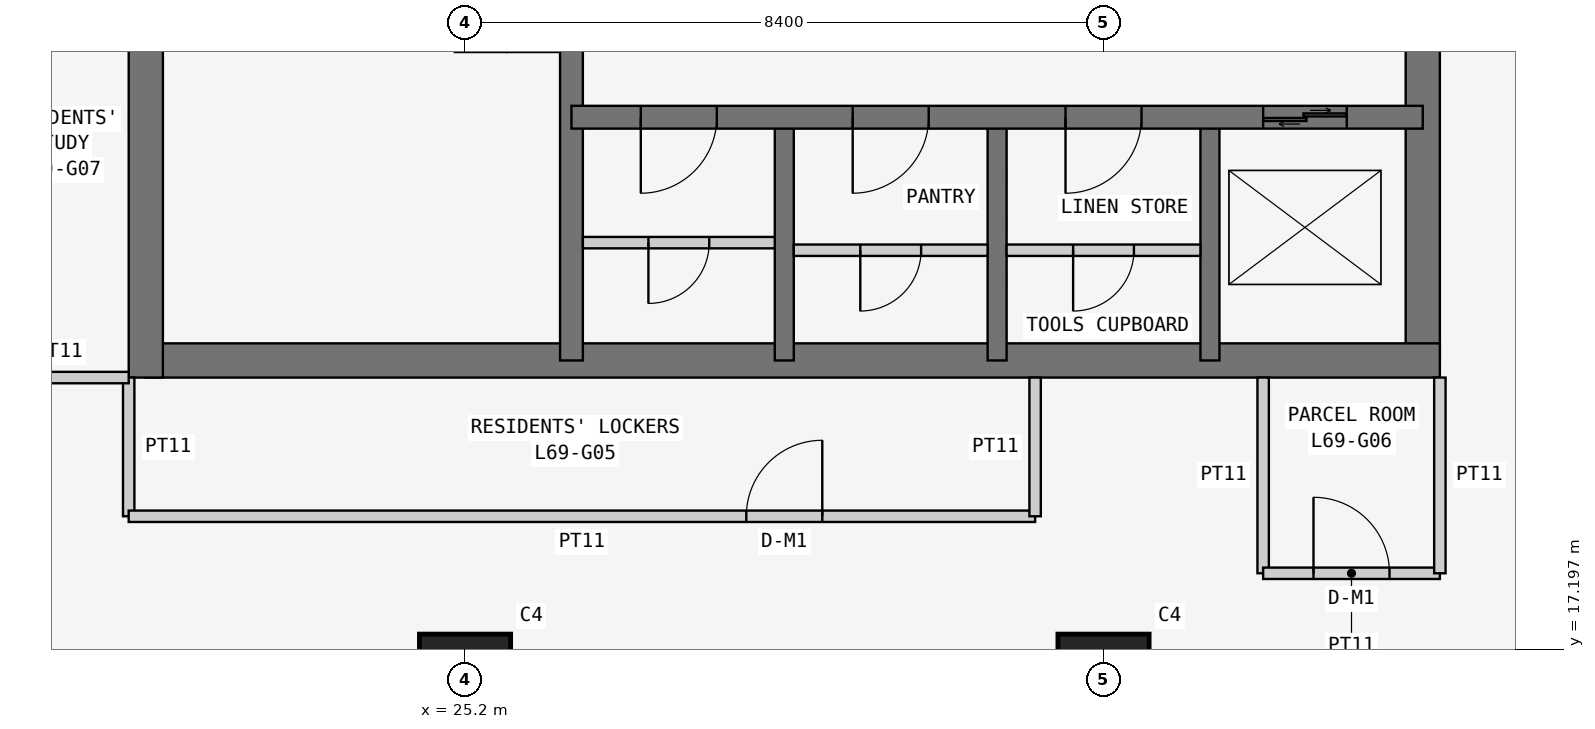
"""IFC4 building model, lengths in metres.
Left out: names, types, materials, properties, quantities, classifications, styles, units other than length and angle.
Written with IfcOpenShell. Run it as: python <this file> out.ifc"""

import sys

from ifc_helpers import new_model, si_unit, direction, frame, frame_2d, origin, origin_2d, place, context, subcontext, project, spatial, rectangle, extrude, element, fill, save


model = new_model("IFC4")
c1 = context("Model", 3, precision=1e-05, world=origin(), true_north=direction((0.0, 1.0)))
c2 = subcontext(c1, "Body", "Model", "MODEL_VIEW")
j1 = project(units=[si_unit("LENGTHUNIT", "METRE"), si_unit("PLANEANGLEUNIT", "RADIAN")], contexts=[c1])
p1 = place(None, origin())
s1 = spatial("IfcSite", under=j1, at=p1, CompositionType="ELEMENT")
p2 = place(p1, origin())
s2 = spatial("IfcBuilding", under=s1, at=p2, CompositionType="ELEMENT")
p3 = place(p2, frame((0.0, 0.0, 264.9)))
s3 = spatial("IfcBuildingStorey", under=s2, at=p3, CompositionType="ELEMENT", Elevation=264.9)
for number, where, z_axis, x_axis in (
    (1, (25.2, 16.8, 0.0), (0.0, 0.0, 1.0), (1.0, 0.0, 0.0)),
    (2, (33.6, 16.8, 0.0), (0.0, 0.0, 1.0), (1.0, 0.0, 0.0)),
):
    element("IfcColumn", number, at=place(p3, frame(where, z_axis=z_axis, x_axis=x_axis)), inside=s3, PredefinedType="COLUMN", context=c2, shape_type="SweptSolid", body=[
        extrude(rectangle(XDim=1.2, YDim=1.2, at=origin_2d()), origin(), (0.0, 0.0, 1.0), 3.6),
    ])
p4 = place(p3, frame((21.0, 21.0, 0.0), z_axis=(0.0, 0.0, 1.0), x_axis=(1.0, 0.0, 0.0)))
e3 = element("IfcWall", 3, at=p4, inside=s3, PredefinedType="SHEAR", context=c2, shape_type="SweptSolid", body=[
    extrude(rectangle(XDim=17.025, YDim=0.45, at=frame_2d((8.512, 0.0))), origin(), (0.0, 0.0, 1.0), 3.6),
])
p5 = place(p3, frame((37.8, 21.0, 0.0), z_axis=(0.0, 0.0, 1.0), x_axis=(0.0, 1.0, 0.0)))
e4 = element("IfcWall", 4, at=p5, inside=s3, PredefinedType="SHEAR", context=c2, shape_type="SweptSolid", body=[
    extrude(rectangle(XDim=17.025, YDim=0.45, at=frame_2d((8.512, 0.0))), origin(), (0.0, 0.0, 1.0), 3.6),
])
p6 = place(p5, frame((5.2, 0.0, 0.0)))
e5 = element("IfcOpeningElement", 5, at=p6, cuts=e4, PredefinedType="OPENING", context=c2, shape_type="SweptSolid", body=[
    extrude(rectangle(XDim=1.2, YDim=2.1, at=frame_2d((0.6, 1.05))), frame((0.0, 0.235, 0.0), z_axis=(0.0, -1.0, 0.0), x_axis=(1.0, 0.0, 0.0)), (0.0, 0.0, 1.0), 0.47),
])
p7 = place(p3, frame((21.0, 37.8, 0.0), z_axis=(0.0, 0.0, 1.0), x_axis=(0.0, -1.0, 0.0)))
e6 = element("IfcWall", 6, at=p7, inside=s3, PredefinedType="SHEAR", context=c2, shape_type="SweptSolid", body=[
    extrude(rectangle(XDim=17.025, YDim=0.45, at=frame_2d((8.513, 0.0))), origin(), (0.0, 0.0, 1.0), 3.6),
])
p8 = place(p7, frame((5.4, 0.0, 0.0)))
e7 = element("IfcOpeningElement", 7, at=p8, cuts=e6, PredefinedType="OPENING", context=c2, shape_type="SweptSolid", body=[
    extrude(rectangle(XDim=1.2, YDim=2.1, at=frame_2d((0.6, 1.05))), frame((0.0, 0.235, 0.0), z_axis=(0.0, -1.0, 0.0), x_axis=(1.0, 0.0, 0.0)), (0.0, 0.0, 1.0), 0.47),
])
p9 = place(p3, frame((26.6, 21.0, 0.0), z_axis=(0.0, 0.0, 1.0), x_axis=(0.0, 1.0, 0.0)))
e8 = element("IfcWall", 8, at=p9, inside=s3, PredefinedType="SHEAR", context=c2, shape_type="SweptSolid", body=[
    extrude(rectangle(XDim=16.8, YDim=0.3, at=frame_2d((8.4, 0.0))), origin(), (0.0, 0.0, 1.0), 3.6),
])
p10 = place(p9, frame((10.4, 0.0, 0.0)))
e9 = element("IfcOpeningElement", 9, at=p10, cuts=e8, PredefinedType="OPENING", context=c2, shape_type="SweptSolid", body=[
    extrude(rectangle(XDim=1.2, YDim=2.1, at=frame_2d((0.6, 1.05))), frame((0.0, 0.16, 0.0), z_axis=(0.0, -1.0, 0.0), x_axis=(1.0, 0.0, 0.0)), (0.0, 0.0, 1.0), 0.32),
])
p11 = place(p3, frame((26.6, 24.2, 0.0), z_axis=(0.0, 0.0, 1.0), x_axis=(1.0, 0.0, 0.0)))
e10 = element("IfcWall", 10, at=p11, inside=s3, PredefinedType="SHEAR", context=c2, shape_type="SweptSolid", body=[
    extrude(rectangle(XDim=11.2, YDim=0.3, at=frame_2d((5.6, 0.0))), origin(), (0.0, 0.0, 1.0), 3.6),
])
p12 = place(p11, frame((0.913, 0.0, 0.0)))
e11 = element("IfcOpeningElement", 11, at=p12, cuts=e10, PredefinedType="OPENING", context=c2, shape_type="SweptSolid", body=[
    extrude(rectangle(XDim=1.0, YDim=2.1, at=frame_2d((0.5, 1.05))), frame((0.0, 0.16, 0.0), z_axis=(0.0, -1.0, 0.0), x_axis=(1.0, 0.0, 0.0)), (0.0, 0.0, 1.0), 0.32),
])
p13 = place(p11, frame((3.7, 0.0, 0.0)))
e12 = element("IfcOpeningElement", 12, at=p13, cuts=e10, PredefinedType="OPENING", context=c2, shape_type="SweptSolid", body=[
    extrude(rectangle(XDim=1.0, YDim=2.1, at=frame_2d((0.5, 1.05))), frame((0.0, 0.16, 0.0), z_axis=(0.0, -1.0, 0.0), x_axis=(1.0, 0.0, 0.0)), (0.0, 0.0, 1.0), 0.32),
])
p14 = place(p11, frame((6.5, 0.0, 0.0)))
e13 = element("IfcOpeningElement", 13, at=p14, cuts=e10, PredefinedType="OPENING", context=c2, shape_type="SweptSolid", body=[
    extrude(rectangle(XDim=1.0, YDim=2.1, at=frame_2d((0.5, 1.05))), frame((0.0, 0.16, 0.0), z_axis=(0.0, -1.0, 0.0), x_axis=(1.0, 0.0, 0.0)), (0.0, 0.0, 1.0), 0.32),
])
p15 = place(p11, frame((9.1, 0.0, 0.0)))
e14 = element("IfcOpeningElement", 14, at=p15, cuts=e10, PredefinedType="OPENING", context=c2, shape_type="SweptSolid", body=[
    extrude(rectangle(XDim=1.1, YDim=2.1, at=frame_2d((0.55, 1.05))), frame((0.0, 0.16, 0.0), z_axis=(0.0, -1.0, 0.0), x_axis=(1.0, 0.0, 0.0)), (0.0, 0.0, 1.0), 0.32),
])
for number, where, z_axis, x_axis in (
    (15, (29.4, 21.0, 0.0), (0.0, 0.0, 1.0), (0.0, 1.0, 0.0)),
    (16, (32.2, 21.0, 0.0), (0.0, 0.0, 1.0), (0.0, 1.0, 0.0)),
    (17, (35.0, 21.0, 0.0), (0.0, 0.0, 1.0), (0.0, 1.0, 0.0)),
):
    element("IfcWall", number, at=place(p3, frame(where, z_axis=z_axis, x_axis=x_axis)), inside=s3, PredefinedType="SHEAR", context=c2, shape_type="SweptSolid", body=[
        extrude(rectangle(XDim=3.2, YDim=0.25, at=frame_2d((1.6, 0.0))), origin(), (0.0, 0.0, 1.0), 3.6),
    ])
p16 = place(p3, frame((20.775, 20.775, 0.0), z_axis=(0.0, 0.0, 1.0), x_axis=(0.0, -1.0, 0.0)))
e18 = element("IfcWall", 18, at=p16, inside=s3, PredefinedType="PARTITIONING", context=c2, shape_type="SweptSolid", body=[
    extrude(rectangle(XDim=1.825, YDim=0.15, at=frame_2d((0.913, 0.0))), origin(), (0.0, 0.0, 1.0), 3.45),
])
p17 = place(p3, frame((20.775, 18.95, 0.0), z_axis=(0.0, 0.0, 1.0), x_axis=(1.0, 0.0, 0.0)))
e19 = element("IfcWall", 19, at=p17, inside=s3, PredefinedType="PARTITIONING", context=c2, shape_type="SweptSolid", body=[
    extrude(rectangle(XDim=11.925, YDim=0.15, at=frame_2d((5.962, 0.0))), origin(), (0.0, 0.0, 1.0), 3.45),
])
p18 = place(p17, frame((8.125, 0.0, 0.0)))
e20 = element("IfcOpeningElement", 20, at=p18, cuts=e19, PredefinedType="OPENING", context=c2, shape_type="SweptSolid", body=[
    extrude(rectangle(XDim=1.0, YDim=2.1, at=frame_2d((0.5, 1.05))), frame((0.0, 0.085, 0.0), z_axis=(0.0, -1.0, 0.0), x_axis=(1.0, 0.0, 0.0)), (0.0, 0.0, 1.0), 0.17),
])
p19 = place(p3, frame((32.7, 18.95, 0.0), z_axis=(0.0, 0.0, 1.0), x_axis=(0.0, 1.0, 0.0)))
e21 = element("IfcWall", 21, at=p19, inside=s3, PredefinedType="PARTITIONING", context=c2, shape_type="SweptSolid", body=[
    extrude(rectangle(XDim=1.825, YDim=0.15, at=frame_2d((0.913, 0.0))), origin(), (0.0, 0.0, 1.0), 3.45),
])
p20 = place(p3, frame((35.7, 20.775, 0.0), z_axis=(0.0, 0.0, 1.0), x_axis=(0.0, -1.0, 0.0)))
e22 = element("IfcWall", 22, at=p20, inside=s3, PredefinedType="PARTITIONING", context=c2, shape_type="SweptSolid", body=[
    extrude(rectangle(XDim=2.575, YDim=0.15, at=frame_2d((1.288, 0.0))), origin(), (0.0, 0.0, 1.0), 3.45),
])
p21 = place(p3, frame((35.7, 18.2, 0.0), z_axis=(0.0, 0.0, 1.0), x_axis=(1.0, 0.0, 0.0)))
e23 = element("IfcWall", 23, at=p21, inside=s3, PredefinedType="PARTITIONING", context=c2, shape_type="SweptSolid", body=[
    extrude(rectangle(XDim=2.325, YDim=0.15, at=frame_2d((1.163, 0.0))), origin(), (0.0, 0.0, 1.0), 3.45),
])
p22 = place(p21, frame((0.663, 0.0, 0.0)))
e24 = element("IfcOpeningElement", 24, at=p22, cuts=e23, PredefinedType="OPENING", context=c2, shape_type="SweptSolid", body=[
    extrude(rectangle(XDim=1.0, YDim=2.1, at=frame_2d((0.5, 1.05))), frame((0.0, 0.085, 0.0), z_axis=(0.0, -1.0, 0.0), x_axis=(1.0, 0.0, 0.0)), (0.0, 0.0, 1.0), 0.17),
])
p23 = place(p3, frame((38.025, 18.2, 0.0), z_axis=(0.0, 0.0, 1.0), x_axis=(0.0, 1.0, 0.0)))
e25 = element("IfcWall", 25, at=p23, inside=s3, PredefinedType="PARTITIONING", context=c2, shape_type="SweptSolid", body=[
    extrude(rectangle(XDim=2.575, YDim=0.15, at=frame_2d((1.288, 0.0))), origin(), (0.0, 0.0, 1.0), 3.45),
])
p24 = place(p3, frame((18.95, 20.775, 0.0), z_axis=(0.0, 0.0, 1.0), x_axis=(1.0, 0.0, 0.0)))
e26 = element("IfcWall", 26, at=p24, inside=s3, PredefinedType="PARTITIONING", context=c2, shape_type="SweptSolid", body=[
    extrude(rectangle(XDim=1.825, YDim=0.15, at=frame_2d((0.913, 0.0))), origin(), (0.0, 0.0, 1.0), 3.45),
])
p25 = place(p3, frame((26.75, 22.55, 0.0), z_axis=(0.0, 0.0, 1.0), x_axis=(1.0, 0.0, 0.0)))
e27 = element("IfcWall", 27, at=p25, inside=s3, PredefinedType="PARTITIONING", context=c2, shape_type="SweptSolid", body=[
    extrude(rectangle(XDim=2.525, YDim=0.15, at=frame_2d((1.262, 0.0))), origin(), (0.0, 0.0, 1.0), 3.45),
])
p26 = place(p25, frame((0.863, 0.0, 0.0)))
e28 = element("IfcOpeningElement", 28, at=p26, cuts=e27, PredefinedType="OPENING", context=c2, shape_type="SweptSolid", body=[
    extrude(rectangle(XDim=0.8, YDim=2.1, at=frame_2d((0.4, 1.05))), frame((0.0, 0.085, 0.0), z_axis=(0.0, -1.0, 0.0), x_axis=(1.0, 0.0, 0.0)), (0.0, 0.0, 1.0), 0.17),
])
p27 = place(p3, frame((29.525, 22.45, 0.0), z_axis=(0.0, 0.0, 1.0), x_axis=(1.0, 0.0, 0.0)))
e29 = element("IfcWall", 29, at=p27, inside=s3, PredefinedType="PARTITIONING", context=c2, shape_type="SweptSolid", body=[
    extrude(rectangle(XDim=2.55, YDim=0.15, at=frame_2d((1.275, 0.0))), origin(), (0.0, 0.0, 1.0), 3.45),
])
p28 = place(p27, frame((0.875, 0.0, 0.0)))
e30 = element("IfcOpeningElement", 30, at=p28, cuts=e29, PredefinedType="OPENING", context=c2, shape_type="SweptSolid", body=[
    extrude(rectangle(XDim=0.8, YDim=2.1, at=frame_2d((0.4, 1.05))), frame((0.0, 0.085, 0.0), z_axis=(0.0, -1.0, 0.0), x_axis=(1.0, 0.0, 0.0)), (0.0, 0.0, 1.0), 0.17),
])
p29 = place(p3, frame((32.325, 22.45, 0.0), z_axis=(0.0, 0.0, 1.0), x_axis=(1.0, 0.0, 0.0)))
e31 = element("IfcWall", 31, at=p29, inside=s3, PredefinedType="PARTITIONING", context=c2, shape_type="SweptSolid", body=[
    extrude(rectangle(XDim=2.55, YDim=0.15, at=frame_2d((1.275, 0.0))), origin(), (0.0, 0.0, 1.0), 3.45),
])
p30 = place(p29, frame((0.875, 0.0, 0.0)))
e32 = element("IfcOpeningElement", 32, at=p30, cuts=e31, PredefinedType="OPENING", context=c2, shape_type="SweptSolid", body=[
    extrude(rectangle(XDim=0.8, YDim=2.1, at=frame_2d((0.4, 1.05))), frame((0.0, 0.085, 0.0), z_axis=(0.0, -1.0, 0.0), x_axis=(1.0, 0.0, 0.0)), (0.0, 0.0, 1.0), 0.17),
])
p31 = place(p18, origin())
e33 = element("IfcDoor", 33, at=p31, inside=s3, OperationType="SINGLE_SWING_RIGHT", PredefinedType="DOOR", context=c2, shape_type="SweptSolid", body=[
    extrude(rectangle(XDim=1.0, YDim=2.1, at=frame_2d((0.5, 1.05))), frame((0.0, 0.025, 0.0), z_axis=(0.0, -1.0, 0.0), x_axis=(1.0, 0.0, 0.0)), (0.0, 0.0, 1.0), 0.05),
])
fill(e20, e33)
p32 = place(p22, origin())
e34 = element("IfcDoor", 34, at=p32, inside=s3, OperationType="SINGLE_SWING_LEFT", PredefinedType="DOOR", context=c2, shape_type="SweptSolid", body=[
    extrude(rectangle(XDim=1.0, YDim=2.1, at=frame_2d((0.5, 1.05))), frame((0.0, 0.025, 0.0), z_axis=(0.0, -1.0, 0.0), x_axis=(1.0, 0.0, 0.0)), (0.0, 0.0, 1.0), 0.05),
])
fill(e24, e34)
p33 = place(p12, frame((1.0, 0.0, 0.0), z_axis=(0.0, 0.0, 1.0), x_axis=(-1.0, 0.0, 0.0)))
e35 = element("IfcDoor", 35, at=p33, inside=s3, OperationType="SINGLE_SWING_RIGHT", PredefinedType="DOOR", context=c2, shape_type="SweptSolid", body=[
    extrude(rectangle(XDim=1.0, YDim=2.1, at=frame_2d((0.5, 1.05))), frame((0.0, 0.025, 0.0), z_axis=(0.0, -1.0, 0.0), x_axis=(1.0, 0.0, 0.0)), (0.0, 0.0, 1.0), 0.05),
])
fill(e11, e35)
p34 = place(p26, frame((0.8, 0.0, 0.0), z_axis=(0.0, 0.0, 1.0), x_axis=(-1.0, 0.0, 0.0)))
e36 = element("IfcDoor", 36, at=p34, inside=s3, OperationType="SINGLE_SWING_RIGHT", PredefinedType="DOOR", context=c2, shape_type="SweptSolid", body=[
    extrude(rectangle(XDim=0.8, YDim=2.1, at=frame_2d((0.4, 1.05))), frame((0.0, 0.025, 0.0), z_axis=(0.0, -1.0, 0.0), x_axis=(1.0, 0.0, 0.0)), (0.0, 0.0, 1.0), 0.05),
])
fill(e28, e36)
p35 = place(p13, frame((1.0, 0.0, 0.0), z_axis=(0.0, 0.0, 1.0), x_axis=(-1.0, 0.0, 0.0)))
e37 = element("IfcDoor", 37, at=p35, inside=s3, OperationType="SINGLE_SWING_RIGHT", PredefinedType="DOOR", context=c2, shape_type="SweptSolid", body=[
    extrude(rectangle(XDim=1.0, YDim=2.1, at=frame_2d((0.5, 1.05))), frame((0.0, 0.025, 0.0), z_axis=(0.0, -1.0, 0.0), x_axis=(1.0, 0.0, 0.0)), (0.0, 0.0, 1.0), 0.05),
])
fill(e12, e37)
p36 = place(p28, frame((0.8, 0.0, 0.0), z_axis=(0.0, 0.0, 1.0), x_axis=(-1.0, 0.0, 0.0)))
e38 = element("IfcDoor", 38, at=p36, inside=s3, OperationType="SINGLE_SWING_RIGHT", PredefinedType="DOOR", context=c2, shape_type="SweptSolid", body=[
    extrude(rectangle(XDim=0.8, YDim=2.1, at=frame_2d((0.4, 1.05))), frame((0.0, 0.025, 0.0), z_axis=(0.0, -1.0, 0.0), x_axis=(1.0, 0.0, 0.0)), (0.0, 0.0, 1.0), 0.05),
])
fill(e30, e38)
p37 = place(p14, frame((1.0, 0.0, 0.0), z_axis=(0.0, 0.0, 1.0), x_axis=(-1.0, 0.0, 0.0)))
e39 = element("IfcDoor", 39, at=p37, inside=s3, OperationType="SINGLE_SWING_RIGHT", PredefinedType="DOOR", context=c2, shape_type="SweptSolid", body=[
    extrude(rectangle(XDim=1.0, YDim=2.1, at=frame_2d((0.5, 1.05))), frame((0.0, 0.025, 0.0), z_axis=(0.0, -1.0, 0.0), x_axis=(1.0, 0.0, 0.0)), (0.0, 0.0, 1.0), 0.05),
])
fill(e13, e39)
p38 = place(p30, frame((0.8, 0.0, 0.0), z_axis=(0.0, 0.0, 1.0), x_axis=(-1.0, 0.0, 0.0)))
e40 = element("IfcDoor", 40, at=p38, inside=s3, OperationType="SINGLE_SWING_RIGHT", PredefinedType="DOOR", context=c2, shape_type="SweptSolid", body=[
    extrude(rectangle(XDim=0.8, YDim=2.1, at=frame_2d((0.4, 1.05))), frame((0.0, 0.025, 0.0), z_axis=(0.0, -1.0, 0.0), x_axis=(1.0, 0.0, 0.0)), (0.0, 0.0, 1.0), 0.05),
])
fill(e32, e40)
p39 = place(p15, origin())
e41 = element("IfcDoor", 41, at=p39, inside=s3, OperationType="DOUBLE_DOOR_SLIDING", PredefinedType="DOOR", context=c2, shape_type="SweptSolid", body=[
    extrude(rectangle(XDim=1.1, YDim=2.1, at=frame_2d((0.55, 1.05))), frame((0.0, 0.025, 0.0), z_axis=(0.0, -1.0, 0.0), x_axis=(1.0, 0.0, 0.0)), (0.0, 0.0, 1.0), 0.05),
])
fill(e14, e41)
save(model, sys.argv[1])
